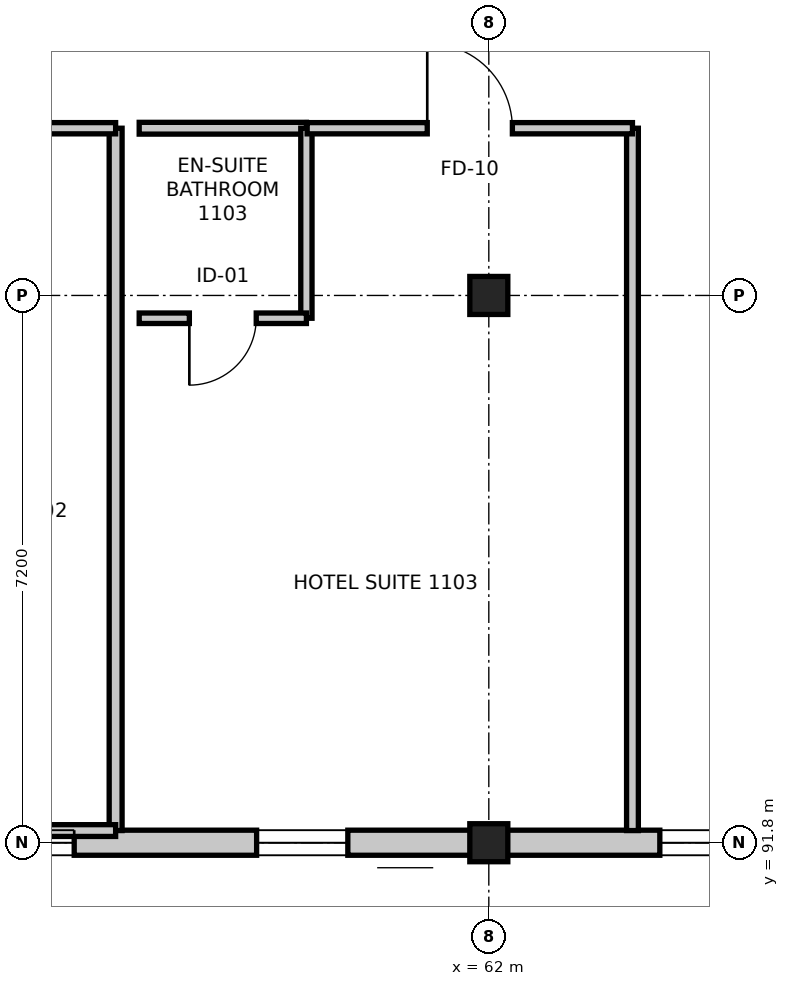
"""IFC4 building model, lengths in metres.
Left out: names, types, materials, properties, quantities, classifications, styles, units other than length and angle.
Written with IfcOpenShell. Run it as: python <this file> out.ifc"""

import sys

from ifc_helpers import new_model, si_unit, direction, frame, frame_2d, origin, origin_2d, place, context, subcontext, project, spatial, rectangle, extrude, element, fill, save


model = new_model("IFC4")
c1 = context("Model", 3, precision=1e-05, world=origin(), true_north=direction((0.0, 1.0)))
c2 = subcontext(c1, "Body", "Model", "MODEL_VIEW")
j1 = project(units=[si_unit("LENGTHUNIT", "METRE"), si_unit("PLANEANGLEUNIT", "RADIAN")], contexts=[c1])
p1 = place(None, origin())
s1 = spatial("IfcSite", under=j1, at=p1, CompositionType="ELEMENT")
p2 = place(p1, origin())
s2 = spatial("IfcBuilding", under=s1, at=p2, CompositionType="ELEMENT")
p3 = place(p2, frame((0.0, 0.0, 44.4)))
s3 = spatial("IfcBuildingStorey", under=s2, at=p3, CompositionType="ELEMENT", Elevation=44.4)
for number, where, z_axis, x_axis in (
    (1, (62.0, 91.8, 0.0), (0.0, 0.0, 1.0), (1.0, 0.0, 0.0)),
    (2, (62.0, 99.0, 0.0), (0.0, 0.0, 1.0), (1.0, 0.0, 0.0)),
):
    element("IfcColumn", number, at=place(p3, frame(where, z_axis=z_axis, x_axis=x_axis)), inside=s3, PredefinedType="COLUMN", context=c2, shape_type="SweptSolid", body=[
        extrude(rectangle(XDim=0.5, YDim=0.5, at=origin_2d()), origin(), (0.0, 0.0, 1.0), 4.2),
    ])
p4 = place(p3, frame((69.2, 91.8, 0.0), z_axis=(0.0, 0.0, 1.0), x_axis=(-1.0, 0.0, 0.0)))
e3 = element("IfcWall", 3, at=p4, inside=s3, PredefinedType="STANDARD", context=c2, shape_type="SweptSolid", body=[
    extrude(rectangle(XDim=7.2, YDim=0.33, at=frame_2d((3.6, 0.0))), origin(), (0.0, 0.0, 1.0), 3.335),
])
p5 = place(p4, frame((2.25, 0.0, 0.9)))
e4 = element("IfcOpeningElement", 4, at=p5, cuts=e3, PredefinedType="OPENING", context=c2, shape_type="SweptSolid", body=[
    extrude(rectangle(XDim=2.7, YDim=2.1, at=frame_2d((1.35, 1.05))), frame((0.0, 0.175, 0.0), z_axis=(0.0, -1.0, 0.0), x_axis=(1.0, 0.0, 0.0)), (0.0, 0.0, 1.0), 0.35),
])
p6 = place(p3, frame((62.0, 91.8, 0.0), z_axis=(0.0, 0.0, 1.0), x_axis=(-1.0, 0.0, 0.0)))
e5 = element("IfcWall", 5, at=p6, inside=s3, PredefinedType="STANDARD", context=c2, shape_type="SweptSolid", body=[
    extrude(rectangle(XDim=7.2, YDim=0.33, at=frame_2d((3.6, 0.0))), origin(), (0.0, 0.0, 1.0), 3.335),
])
p7 = place(p6, frame((1.855, 0.0, 0.9)))
e6 = element("IfcOpeningElement", 6, at=p7, cuts=e5, PredefinedType="OPENING", context=c2, shape_type="SweptSolid", body=[
    extrude(rectangle(XDim=1.2, YDim=1.8, at=frame_2d((0.6, 0.9))), frame((0.0, 0.175, 0.0), z_axis=(0.0, -1.0, 0.0), x_axis=(1.0, 0.0, 0.0)), (0.0, 0.0, 1.0), 0.35),
])
p8 = place(p6, frame((5.455, 0.0, 0.85)))
e7 = element("IfcOpeningElement", 7, at=p8, cuts=e5, PredefinedType="OPENING", context=c2, shape_type="SweptSolid", body=[
    extrude(rectangle(XDim=1.2, YDim=1.8, at=frame_2d((0.6, 0.9))), frame((0.0, 0.175, 0.0), z_axis=(0.0, -1.0, 0.0), x_axis=(1.0, 0.0, 0.0)), (0.0, 0.0, 1.0), 0.35),
])
p9 = place(p3, frame((57.09, 101.2, 0.0), z_axis=(0.0, 0.0, 1.0), x_axis=(0.0, -1.0, 0.0)))
e8 = element("IfcWall", 8, at=p9, inside=s3, PredefinedType="PARTITIONING", context=c2, shape_type="SweptSolid", body=[
    extrude(rectangle(XDim=9.24, YDim=0.17, at=frame_2d((4.62, 0.0))), origin(), (0.0, 0.0, 1.0), 3.335),
])
p10 = place(p3, frame((57.09, 91.96, 0.0), z_axis=(0.0, 0.0, 1.0), x_axis=(-1.0, 0.0, 0.0)))
e9 = element("IfcWall", 9, at=p10, inside=s3, PredefinedType="PARTITIONING", context=c2, shape_type="SweptSolid", body=[
    extrude(rectangle(XDim=6.64, YDim=0.155, at=frame_2d((3.32, 0.0))), origin(), (0.0, 0.0, 1.0), 3.285),
])
p11 = place(p3, frame((52.81, 101.2, 0.0), z_axis=(0.0, 0.0, 1.0), x_axis=(1.0, 0.0, 0.0)))
e10 = element("IfcWall", 10, at=p11, inside=s3, PredefinedType="PARTITIONING", context=c2, shape_type="SweptSolid", body=[
    extrude(rectangle(XDim=4.28, YDim=0.148, at=frame_2d((2.14, 0.0))), origin(), (0.0, 0.0, 1.0), 3.285),
])
p12 = place(p11, frame((1.63, 0.0, 0.0)))
e11 = element("IfcOpeningElement", 11, at=p12, cuts=e10, PredefinedType="OPENING", context=c2, shape_type="SweptSolid", body=[
    extrude(rectangle(XDim=1.02, YDim=2.15, at=frame_2d((0.51, 1.075))), frame((0.0, 0.084, 0.0), z_axis=(0.0, -1.0, 0.0), x_axis=(1.0, 0.0, 0.0)), (0.0, 0.0, 1.0), 0.168),
])
p13 = place(p3, frame((57.4, 101.2, 0.0), z_axis=(0.0, 0.0, 1.0), x_axis=(1.0, 0.0, 0.0)))
e12 = element("IfcWall", 12, at=p13, inside=s3, PredefinedType="PARTITIONING", context=c2, shape_type="SweptSolid", body=[
    extrude(rectangle(XDim=2.2, YDim=0.155, at=frame_2d((1.1, 0.0))), origin(), (0.0, 0.0, 1.0), 3.95),
])
p14 = place(p3, frame((59.6, 101.2, 0.0), z_axis=(0.0, 0.0, 1.0), x_axis=(0.0, -1.0, 0.0)))
e13 = element("IfcWall", 13, at=p14, inside=s3, PredefinedType="PARTITIONING", context=c2, shape_type="SweptSolid", body=[
    extrude(rectangle(XDim=2.5, YDim=0.148, at=frame_2d((1.25, 0.0))), origin(), (0.0, 0.0, 1.0), 3.335),
])
p15 = place(p3, frame((59.6, 98.7, 0.0), z_axis=(0.0, 0.0, 1.0), x_axis=(-1.0, 0.0, 0.0)))
e14 = element("IfcWall", 14, at=p15, inside=s3, PredefinedType="PARTITIONING", context=c2, shape_type="SweptSolid", body=[
    extrude(rectangle(XDim=2.2, YDim=0.138, at=frame_2d((1.1, 0.0))), origin(), (0.0, 0.0, 1.0), 3.95),
])
p16 = place(p15, frame((0.66, 0.0, 0.0)))
e15 = element("IfcOpeningElement", 15, at=p16, cuts=e14, PredefinedType="OPENING", context=c2, shape_type="SweptSolid", body=[
    extrude(rectangle(XDim=0.88, YDim=2.06, at=frame_2d((0.44, 1.03))), frame((0.0, 0.079, 0.0), z_axis=(0.0, -1.0, 0.0), x_axis=(1.0, 0.0, 0.0)), (0.0, 0.0, 1.0), 0.158),
])
p17 = place(p3, frame((63.89, 101.2, 0.0), z_axis=(0.0, 0.0, 1.0), x_axis=(0.0, -1.0, 0.0)))
e16 = element("IfcWall", 16, at=p17, inside=s3, PredefinedType="PARTITIONING", context=c2, shape_type="SweptSolid", body=[
    extrude(rectangle(XDim=9.24, YDim=0.155, at=frame_2d((4.62, 0.0))), origin(), (0.0, 0.0, 1.0), 3.335),
])
p18 = place(p3, frame((59.61, 101.2, 0.0), z_axis=(0.0, 0.0, 1.0), x_axis=(1.0, 0.0, 0.0)))
e17 = element("IfcWall", 17, at=p18, inside=s3, PredefinedType="PARTITIONING", context=c2, shape_type="SweptSolid", body=[
    extrude(rectangle(XDim=4.28, YDim=0.148, at=frame_2d((2.14, 0.0))), origin(), (0.0, 0.0, 1.0), 3.285),
])
p19 = place(p18, frame((1.58, 0.0, 0.0)))
e18 = element("IfcOpeningElement", 18, at=p19, cuts=e17, PredefinedType="OPENING", context=c2, shape_type="SweptSolid", body=[
    extrude(rectangle(XDim=1.12, YDim=2.2, at=frame_2d((0.56, 1.1))), frame((0.0, 0.084, 0.0), z_axis=(0.0, -1.0, 0.0), x_axis=(1.0, 0.0, 0.0)), (0.0, 0.0, 1.0), 0.168),
])
p20 = place(p5, origin())
e19 = element("IfcWindow", 19, at=p20, inside=s3, PartitioningType="SINGLE_PANEL", PredefinedType="WINDOW", context=c2, shape_type="SweptSolid", body=[
    extrude(rectangle(XDim=2.7, YDim=2.1, at=frame_2d((1.35, 1.05))), frame((0.0, 0.03, 0.0), z_axis=(0.0, -1.0, 0.0), x_axis=(1.0, 0.0, 0.0)), (0.0, 0.0, 1.0), 0.06),
])
fill(e4, e19)
p21 = place(p7, origin())
e20 = element("IfcWindow", 20, at=p21, inside=s3, PartitioningType="SINGLE_PANEL", PredefinedType="WINDOW", context=c2, shape_type="SweptSolid", body=[
    extrude(rectangle(XDim=1.2, YDim=1.8, at=frame_2d((0.6, 0.9))), frame((0.0, 0.03, 0.0), z_axis=(0.0, -1.0, 0.0), x_axis=(1.0, 0.0, 0.0)), (0.0, 0.0, 1.0), 0.06),
])
fill(e6, e20)
p22 = place(p8, origin())
e21 = element("IfcWindow", 21, at=p22, inside=s3, PartitioningType="SINGLE_PANEL", PredefinedType="WINDOW", context=c2, shape_type="SweptSolid", body=[
    extrude(rectangle(XDim=1.2, YDim=1.8, at=frame_2d((0.6, 0.9))), frame((0.0, 0.03, 0.0), z_axis=(0.0, -1.0, 0.0), x_axis=(1.0, 0.0, 0.0)), (0.0, 0.0, 1.0), 0.06),
])
fill(e7, e21)
p23 = place(p2, frame((0.0, 0.0, 48.6)))
p24 = place(p23, frame((0.0, 0.0, -0.25)))
p25 = place(p24, frame((65.6, 102.6, 0.0)))
p26 = place(p25, frame((0.0, 0.0, 0.2)))
e22 = element("IfcWindow", 22, at=p26, inside=s3, PartitioningType="SINGLE_PANEL", PredefinedType="SKYLIGHT", context=c2, shape_type="SweptSolid", body=[
    extrude(rectangle(XDim=2.4, YDim=2.4, at=origin_2d()), origin(), (0.0, 0.0, 1.0), 0.05),
])
p27 = place(p16, origin())
e23 = element("IfcDoor", 23, at=p27, inside=s3, OperationType="SINGLE_SWING_RIGHT", PredefinedType="DOOR", context=c2, shape_type="SweptSolid", body=[
    extrude(rectangle(XDim=0.88, YDim=2.06, at=frame_2d((0.44, 1.03))), frame((0.0, 0.025, 0.0), z_axis=(0.0, -1.0, 0.0), x_axis=(1.0, 0.0, 0.0)), (0.0, 0.0, 1.0), 0.05),
])
fill(e15, e23)
p28 = place(p19, origin())
e24 = element("IfcDoor", 24, at=p28, inside=s3, OperationType="SINGLE_SWING_LEFT", PredefinedType="DOOR", context=c2, shape_type="SweptSolid", body=[
    extrude(rectangle(XDim=1.12, YDim=2.2, at=frame_2d((0.56, 1.1))), frame((0.0, 0.025, 0.0), z_axis=(0.0, -1.0, 0.0), x_axis=(1.0, 0.0, 0.0)), (0.0, 0.0, 1.0), 0.05),
])
fill(e18, e24)
save(model, sys.argv[1])
